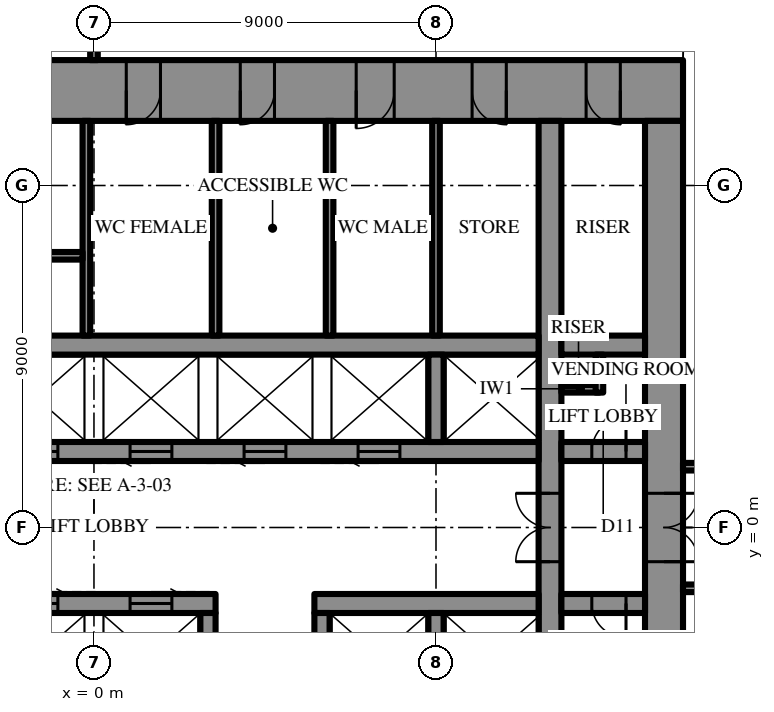
"""IFC4 building model, lengths in metres.
Left out: names, types, materials, properties, quantities, classifications, styles, units other than length and angle.
Written with IfcOpenShell. Run it as: python <this file> out.ifc"""

import sys

from ifc_helpers import new_model, si_unit, direction, frame, frame_2d, origin, place, context, subcontext, project, spatial, rectangle, extrude, element, fill, save


model = new_model("IFC4")
c1 = context("Model", 3, precision=1e-05, world=origin(), true_north=direction((0.0, 1.0)))
c2 = subcontext(c1, "Body", "Model", "MODEL_VIEW")
j1 = project(units=[si_unit("LENGTHUNIT", "METRE"), si_unit("PLANEANGLEUNIT", "RADIAN")], contexts=[c1])
p1 = place(None, origin())
s1 = spatial("IfcSite", under=j1, at=p1, CompositionType="ELEMENT")
p2 = place(p1, origin())
s2 = spatial("IfcBuilding", under=s1, at=p2, CompositionType="ELEMENT")
p3 = place(p2, frame((0.0, 0.0, 219.7)))
s3 = spatial("IfcBuildingStorey", under=s2, at=p3, CompositionType="ELEMENT", Elevation=219.7)
p4 = place(p3, frame((-15.5, 11.5, 0.0), z_axis=(0.0, 0.0, 1.0), x_axis=(1.0, 0.0, 0.0)))
e1 = element("IfcWall", 1, at=p4, inside=s3, PredefinedType="SHEAR", context=c2, shape_type="SweptSolid", body=[
    extrude(rectangle(XDim=31.0, YDim=1.6, at=frame_2d((15.5, 0.0))), origin(), (0.0, 0.0, 1.0), 4.2),
])
p5 = place(p4, frame((16.35, 0.0, 0.0)))
e2 = element("IfcOpeningElement", 2, at=p5, cuts=e1, PredefinedType="OPENING", context=c2, shape_type="SweptSolid", body=[
    extrude(rectangle(XDim=0.9, YDim=2.2, at=frame_2d((0.45, 1.1))), frame((0.0, 0.81, 0.0), z_axis=(0.0, -1.0, 0.0), x_axis=(1.0, 0.0, 0.0)), (0.0, 0.0, 1.0), 1.62),
])
p6 = place(p4, frame((19.35, 0.0, 0.0)))
e3 = element("IfcOpeningElement", 3, at=p6, cuts=e1, PredefinedType="OPENING", context=c2, shape_type="SweptSolid", body=[
    extrude(rectangle(XDim=0.9, YDim=2.2, at=frame_2d((0.45, 1.1))), frame((0.0, 0.81, 0.0), z_axis=(0.0, -1.0, 0.0), x_axis=(1.0, 0.0, 0.0)), (0.0, 0.0, 1.0), 1.62),
])
p7 = place(p4, frame((22.4, 0.0, 0.0)))
e4 = element("IfcOpeningElement", 4, at=p7, cuts=e1, PredefinedType="OPENING", context=c2, shape_type="SweptSolid", body=[
    extrude(rectangle(XDim=1.0, YDim=2.2, at=frame_2d((0.5, 1.1))), frame((0.0, 0.81, 0.0), z_axis=(0.0, -1.0, 0.0), x_axis=(1.0, 0.0, 0.0)), (0.0, 0.0, 1.0), 1.62),
])
p8 = place(p4, frame((1.65, 0.0, 0.0)))
e5 = element("IfcOpeningElement", 5, at=p8, cuts=e1, PredefinedType="OPENING", context=c2, shape_type="SweptSolid", body=[
    extrude(rectangle(XDim=0.9, YDim=2.2, at=frame_2d((0.45, 1.1))), frame((0.0, 0.81, 0.0), z_axis=(0.0, -1.0, 0.0), x_axis=(1.0, 0.0, 0.0)), (0.0, 0.0, 1.0), 1.62),
])
p9 = place(p4, frame((4.65, 0.0, 0.0)))
e6 = element("IfcOpeningElement", 6, at=p9, cuts=e1, PredefinedType="OPENING", context=c2, shape_type="SweptSolid", body=[
    extrude(rectangle(XDim=0.9, YDim=2.2, at=frame_2d((0.45, 1.1))), frame((0.0, 0.81, 0.0), z_axis=(0.0, -1.0, 0.0), x_axis=(1.0, 0.0, 0.0)), (0.0, 0.0, 1.0), 1.62),
])
p10 = place(p4, frame((25.45, 0.0, 0.0)))
e7 = element("IfcOpeningElement", 7, at=p10, cuts=e1, PredefinedType="OPENING", context=c2, shape_type="SweptSolid", body=[
    extrude(rectangle(XDim=0.9, YDim=2.2, at=frame_2d((0.45, 1.1))), frame((0.0, 0.81, 0.0), z_axis=(0.0, -1.0, 0.0), x_axis=(1.0, 0.0, 0.0)), (0.0, 0.0, 1.0), 1.62),
])
p11 = place(p4, frame((28.45, 0.0, 0.0)))
e8 = element("IfcOpeningElement", 8, at=p11, cuts=e1, PredefinedType="OPENING", context=c2, shape_type="SweptSolid", body=[
    extrude(rectangle(XDim=0.9, YDim=2.2, at=frame_2d((0.45, 1.1))), frame((0.0, 0.81, 0.0), z_axis=(0.0, -1.0, 0.0), x_axis=(1.0, 0.0, 0.0)), (0.0, 0.0, 1.0), 1.62),
])
p12 = place(p3, frame((15.0, -10.7, 0.0), z_axis=(0.0, 0.0, 1.0), x_axis=(0.0, 1.0, 0.0)))
e9 = element("IfcWall", 9, at=p12, inside=s3, PredefinedType="SHEAR", context=c2, shape_type="SweptSolid", body=[
    extrude(rectangle(XDim=21.4, YDim=1.0, at=frame_2d((10.7, 0.0))), origin(), (0.0, 0.0, 1.0), 4.2),
])
p13 = place(p12, frame((9.8, 0.0, 0.0)))
e10 = element("IfcOpeningElement", 10, at=p13, cuts=e9, PredefinedType="OPENING", context=c2, shape_type="SweptSolid", body=[
    extrude(rectangle(XDim=1.8, YDim=2.4, at=frame_2d((0.9, 1.2))), frame((0.0, 0.51, 0.0), z_axis=(0.0, -1.0, 0.0), x_axis=(1.0, 0.0, 0.0)), (0.0, 0.0, 1.0), 1.02),
])
p14 = place(p3, frame((12.0, -10.7, 0.0), z_axis=(0.0, 0.0, 1.0), x_axis=(0.0, 1.0, 0.0)))
e11 = element("IfcWall", 11, at=p14, inside=s3, PredefinedType="SHEAR", context=c2, shape_type="SweptSolid", body=[
    extrude(rectangle(XDim=21.4, YDim=0.6, at=frame_2d((10.7, 0.0))), origin(), (0.0, 0.0, 1.0), 4.2),
])
p15 = place(p14, frame((9.8, 0.0, 0.0)))
e12 = element("IfcOpeningElement", 12, at=p15, cuts=e11, PredefinedType="OPENING", context=c2, shape_type="SweptSolid", body=[
    extrude(rectangle(XDim=1.8, YDim=2.4, at=frame_2d((0.9, 1.2))), frame((0.0, 0.31, 0.0), z_axis=(0.0, -1.0, 0.0), x_axis=(1.0, 0.0, 0.0)), (0.0, 0.0, 1.0), 0.62),
])
p16 = place(p3, frame((-3.2, 2.0, 0.0), z_axis=(0.0, 0.0, 1.0), x_axis=(1.0, 0.0, 0.0)))
e13 = element("IfcWall", 13, at=p16, inside=s3, PredefinedType="SHEAR", context=c2, shape_type="SweptSolid", body=[
    extrude(rectangle(XDim=14.9, YDim=0.5, at=frame_2d((7.45, 0.0))), origin(), (0.0, 0.0, 1.0), 4.2),
])
p17 = place(p16, frame((1.15, 0.0, 0.0)))
e14 = element("IfcOpeningElement", 14, at=p17, cuts=e13, PredefinedType="OPENING", context=c2, shape_type="SweptSolid", body=[
    extrude(rectangle(XDim=1.1, YDim=2.2, at=frame_2d((0.55, 1.1))), frame((0.0, 0.26, 0.0), z_axis=(0.0, -1.0, 0.0), x_axis=(1.0, 0.0, 0.0)), (0.0, 0.0, 1.0), 0.52),
])
p18 = place(p16, frame((4.15, 0.0, 0.0)))
e15 = element("IfcOpeningElement", 15, at=p18, cuts=e13, PredefinedType="OPENING", context=c2, shape_type="SweptSolid", body=[
    extrude(rectangle(XDim=1.1, YDim=2.2, at=frame_2d((0.55, 1.1))), frame((0.0, 0.26, 0.0), z_axis=(0.0, -1.0, 0.0), x_axis=(1.0, 0.0, 0.0)), (0.0, 0.0, 1.0), 0.52),
])
p19 = place(p16, frame((7.15, 0.0, 0.0)))
e16 = element("IfcOpeningElement", 16, at=p19, cuts=e13, PredefinedType="OPENING", context=c2, shape_type="SweptSolid", body=[
    extrude(rectangle(XDim=1.1, YDim=2.2, at=frame_2d((0.55, 1.1))), frame((0.0, 0.26, 0.0), z_axis=(0.0, -1.0, 0.0), x_axis=(1.0, 0.0, 0.0)), (0.0, 0.0, 1.0), 0.52),
])
p20 = place(p16, frame((10.15, 0.0, 0.0)))
e17 = element("IfcOpeningElement", 17, at=p20, cuts=e13, PredefinedType="OPENING", context=c2, shape_type="SweptSolid", body=[
    extrude(rectangle(XDim=1.1, YDim=2.2, at=frame_2d((0.55, 1.1))), frame((0.0, 0.26, 0.0), z_axis=(0.0, -1.0, 0.0), x_axis=(1.0, 0.0, 0.0)), (0.0, 0.0, 1.0), 0.52),
])
p21 = place(p3, frame((12.3, 2.0, 0.0), z_axis=(0.0, 0.0, 1.0), x_axis=(1.0, 0.0, 0.0)))
e18 = element("IfcWall", 18, at=p21, inside=s3, PredefinedType="SHEAR", context=c2, shape_type="SweptSolid", body=[
    extrude(rectangle(XDim=2.2, YDim=0.5, at=frame_2d((1.1, 0.0))), origin(), (0.0, 0.0, 1.0), 4.2),
])
p22 = place(p21, frame((0.8, 0.0, 0.0)))
e19 = element("IfcOpeningElement", 19, at=p22, cuts=e18, PredefinedType="OPENING", context=c2, shape_type="SweptSolid", body=[
    extrude(rectangle(XDim=0.9, YDim=2.2, at=frame_2d((0.45, 1.1))), frame((0.0, 0.26, 0.0), z_axis=(0.0, -1.0, 0.0), x_axis=(1.0, 0.0, 0.0)), (0.0, 0.0, 1.0), 0.52),
])
p23 = place(p3, frame((-11.7, 4.8, 0.0), z_axis=(0.0, 0.0, 1.0), x_axis=(1.0, 0.0, 0.0)))
e20 = element("IfcWall", 20, at=p23, inside=s3, PredefinedType="SHEAR", context=c2, shape_type="SweptSolid", body=[
    extrude(rectangle(XDim=23.4, YDim=0.5, at=frame_2d((11.7, 0.0))), origin(), (0.0, 0.0, 1.0), 4.2),
])
p24 = place(p23, frame((6.6, 0.0, 0.0)))
e21 = element("IfcOpeningElement", 21, at=p24, cuts=e20, PredefinedType="OPENING", context=c2, shape_type="SweptSolid", body=[
    extrude(rectangle(XDim=1.2, YDim=2.2, at=frame_2d((0.6, 1.1))), frame((0.0, 0.26, 0.0), z_axis=(0.0, -1.0, 0.0), x_axis=(1.0, 0.0, 0.0)), (0.0, 0.0, 1.0), 0.52),
])
p25 = place(p23, frame((3.6, 0.0, 0.0)))
e22 = element("IfcOpeningElement", 22, at=p25, cuts=e20, PredefinedType="OPENING", context=c2, shape_type="SweptSolid", body=[
    extrude(rectangle(XDim=1.2, YDim=2.2, at=frame_2d((0.6, 1.1))), frame((0.0, 0.26, 0.0), z_axis=(0.0, -1.0, 0.0), x_axis=(1.0, 0.0, 0.0)), (0.0, 0.0, 1.0), 0.52),
])
p26 = place(p3, frame((12.3, 4.8, 0.0), z_axis=(0.0, 0.0, 1.0), x_axis=(1.0, 0.0, 0.0)))
e23 = element("IfcWall", 23, at=p26, inside=s3, PredefinedType="SHEAR", context=c2, shape_type="SweptSolid", body=[
    extrude(rectangle(XDim=2.2, YDim=0.5, at=frame_2d((1.1, 0.0))), origin(), (0.0, 0.0, 1.0), 4.2),
])
p27 = place(p3, frame((9.0, 2.25, 0.0), z_axis=(0.0, 0.0, 1.0), x_axis=(0.0, 1.0, 0.0)))
e24 = element("IfcWall", 24, at=p27, inside=s3, PredefinedType="SHEAR", context=c2, shape_type="SweptSolid", body=[
    extrude(rectangle(XDim=2.3, YDim=0.4, at=frame_2d((1.15, 0.0))), origin(), (0.0, 0.0, 1.0), 4.2),
])
p28 = place(p3, frame((-0.2, 5.05, 0.0), z_axis=(0.0, 0.0, 1.0), x_axis=(0.0, 1.0, 0.0)))
e25 = element("IfcWall", 25, at=p28, inside=s3, PredefinedType="SHEAR", context=c2, shape_type="SweptSolid", body=[
    extrude(rectangle(XDim=5.65, YDim=0.2, at=frame_2d((2.825, 0.0))), origin(), (0.0, 0.0, 1.0), 4.2),
])
p29 = place(p3, frame((-8.9, 7.15, 0.0), z_axis=(0.0, 0.0, 1.0), x_axis=(1.0, 0.0, 0.0)))
e26 = element("IfcWall", 26, at=p29, inside=s3, PredefinedType="SHEAR", context=c2, shape_type="SweptSolid", body=[
    extrude(rectangle(XDim=8.6, YDim=0.2, at=frame_2d((4.3, 0.0))), origin(), (0.0, 0.0, 1.0), 4.2),
])
p30 = place(p29, frame((0.3, 0.0, 0.0)))
e27 = element("IfcOpeningElement", 27, at=p30, cuts=e26, PredefinedType="OPENING", context=c2, shape_type="SweptSolid", body=[
    extrude(rectangle(XDim=1.0, YDim=2.2, at=frame_2d((0.5, 1.1))), frame((0.0, 0.11, 0.0), z_axis=(0.0, -1.0, 0.0), x_axis=(1.0, 0.0, 0.0)), (0.0, 0.0, 1.0), 0.22),
])
p31 = place(p3, frame((14.5, -2.0, 0.0), z_axis=(0.0, 0.0, 1.0), x_axis=(-1.0, 0.0, 0.0)))
e28 = element("IfcWall", 28, at=p31, inside=s3, PredefinedType="SHEAR", context=c2, shape_type="SweptSolid", body=[
    extrude(rectangle(XDim=2.2, YDim=0.5, at=frame_2d((1.1, 0.0))), origin(), (0.0, 0.0, 1.0), 4.2),
])
p32 = place(p31, frame((0.5, 0.0, 0.0)))
e29 = element("IfcOpeningElement", 29, at=p32, cuts=e28, PredefinedType="OPENING", context=c2, shape_type="SweptSolid", body=[
    extrude(rectangle(XDim=0.9, YDim=2.2, at=frame_2d((0.45, 1.1))), frame((0.0, 0.26, 0.0), z_axis=(0.0, -1.0, 0.0), x_axis=(1.0, 0.0, 0.0)), (0.0, 0.0, 1.0), 0.52),
])
p33 = place(p3, frame((11.7, -2.0, 0.0), z_axis=(0.0, 0.0, 1.0), x_axis=(-1.0, 0.0, 0.0)))
e30 = element("IfcWall", 30, at=p33, inside=s3, PredefinedType="SHEAR", context=c2, shape_type="SweptSolid", body=[
    extrude(rectangle(XDim=5.9, YDim=0.5, at=frame_2d((2.95, 0.0))), origin(), (0.0, 0.0, 1.0), 4.2),
])
p34 = place(p3, frame((3.2, -2.0, 0.0), z_axis=(0.0, 0.0, 1.0), x_axis=(-1.0, 0.0, 0.0)))
e31 = element("IfcWall", 31, at=p34, inside=s3, PredefinedType="SHEAR", context=c2, shape_type="SweptSolid", body=[
    extrude(rectangle(XDim=14.9, YDim=0.5, at=frame_2d((7.45, 0.0))), origin(), (0.0, 0.0, 1.0), 4.2),
])
p35 = place(p34, frame((1.15, 0.0, 0.0)))
e32 = element("IfcOpeningElement", 32, at=p35, cuts=e31, PredefinedType="OPENING", context=c2, shape_type="SweptSolid", body=[
    extrude(rectangle(XDim=1.1, YDim=2.2, at=frame_2d((0.55, 1.1))), frame((0.0, 0.26, 0.0), z_axis=(0.0, -1.0, 0.0), x_axis=(1.0, 0.0, 0.0)), (0.0, 0.0, 1.0), 0.52),
])
p36 = place(p34, frame((4.15, 0.0, 0.0)))
e33 = element("IfcOpeningElement", 33, at=p36, cuts=e31, PredefinedType="OPENING", context=c2, shape_type="SweptSolid", body=[
    extrude(rectangle(XDim=1.1, YDim=2.2, at=frame_2d((0.55, 1.1))), frame((0.0, 0.26, 0.0), z_axis=(0.0, -1.0, 0.0), x_axis=(1.0, 0.0, 0.0)), (0.0, 0.0, 1.0), 0.52),
])
p37 = place(p34, frame((7.15, 0.0, 0.0)))
e34 = element("IfcOpeningElement", 34, at=p37, cuts=e31, PredefinedType="OPENING", context=c2, shape_type="SweptSolid", body=[
    extrude(rectangle(XDim=1.1, YDim=2.2, at=frame_2d((0.55, 1.1))), frame((0.0, 0.26, 0.0), z_axis=(0.0, -1.0, 0.0), x_axis=(1.0, 0.0, 0.0)), (0.0, 0.0, 1.0), 0.52),
])
p38 = place(p34, frame((10.15, 0.0, 0.0)))
e35 = element("IfcOpeningElement", 35, at=p38, cuts=e31, PredefinedType="OPENING", context=c2, shape_type="SweptSolid", body=[
    extrude(rectangle(XDim=1.1, YDim=2.2, at=frame_2d((0.55, 1.1))), frame((0.0, 0.26, 0.0), z_axis=(0.0, -1.0, 0.0), x_axis=(1.0, 0.0, 0.0)), (0.0, 0.0, 1.0), 0.52),
])
for number, where, z_axis, x_axis in (
    (36, (9.0, -2.25, 0.0), (0.0, 0.0, 1.0), (0.0, -1.0, 0.0)),
    (37, (6.0, -2.25, 0.0), (0.0, 0.0, 1.0), (0.0, -1.0, 0.0)),
    (38, (3.0, -2.25, 0.0), (0.0, 0.0, 1.0), (0.0, -1.0, 0.0)),
):
    element("IfcWall", number, at=place(p3, frame(where, z_axis=z_axis, x_axis=x_axis)), inside=s3, PredefinedType="SHEAR", context=c2, shape_type="SweptSolid", body=[
        extrude(rectangle(XDim=2.3, YDim=0.4, at=frame_2d((1.15, 0.0))), origin(), (0.0, 0.0, 1.0), 4.2),
    ])
for number, where, z_axis, x_axis in (
    (39, (9.0, 5.05, 0.0), (0.0, 0.0, 1.0), (0.0, 1.0, 0.0)),
    (40, (3.2, 5.05, 0.0), (0.0, 0.0, 1.0), (0.0, 1.0, 0.0)),
    (41, (6.2, 5.05, 0.0), (0.0, 0.0, 1.0), (0.0, 1.0, 0.0)),
):
    element("IfcWall", number, at=place(p3, frame(where, z_axis=z_axis, x_axis=x_axis)), inside=s3, PredefinedType="PARTITIONING", context=c2, shape_type="SweptSolid", body=[
        extrude(rectangle(XDim=5.65, YDim=0.2, at=frame_2d((2.825, 0.0))), origin(), (0.0, 0.0, 1.0), 4.0),
    ])
for number, where, z_axis, x_axis in (
    (42, (12.3, 3.65, 0.0), (0.0, 0.0, 1.0), (1.0, 0.0, 0.0)),
    (43, (13.3, 3.55, 0.0), (0.0, 0.0, 1.0), (0.0, 1.0, 0.0)),
):
    element("IfcWall", number, at=place(p3, frame(where, z_axis=z_axis, x_axis=x_axis)), inside=s3, PredefinedType="PARTITIONING", context=c2, shape_type="SweptSolid", body=[
        extrude(rectangle(XDim=1.0, YDim=0.2, at=frame_2d((0.5, 0.0))), origin(), (0.0, 0.0, 1.0), 4.0),
    ])
for number, where, z_axis, x_axis in (
    (44, (15.5, 1.6, 0.0), (0.0, 0.0, 1.0), (1.0, 0.0, 0.0)),
    (45, (15.5, -1.6, 0.0), (0.0, 0.0, 1.0), (1.0, 0.0, 0.0)),
):
    element("IfcWall", number, at=place(p3, frame(where, z_axis=z_axis, x_axis=x_axis)), inside=s3, PredefinedType="PARTITIONING", context=c2, shape_type="SweptSolid", body=[
        extrude(rectangle(XDim=2.3, YDim=0.2, at=frame_2d((1.15, 0.0))), origin(), (0.0, 0.0, 1.0), 4.0),
    ])
p39 = place(p3, frame((0.0, 12.3, 0.0), z_axis=(0.0, 0.0, 1.0), x_axis=(0.0, 1.0, 0.0)))
e46 = element("IfcWall", 46, at=p39, inside=s3, PredefinedType="PARTITIONING", context=c2, shape_type="SweptSolid", body=[
    extrude(rectangle(XDim=1.7, YDim=0.2, at=frame_2d((0.85, 0.0))), origin(), (0.0, 0.0, 1.0), 2.992),
])
p40 = place(p39, frame((0.35, 0.0, 0.0)))
e47 = element("IfcOpeningElement", 47, at=p40, cuts=e46, PredefinedType="OPENING", context=c2, shape_type="SweptSolid", body=[
    extrude(rectangle(XDim=1.0, YDim=2.2, at=frame_2d((0.5, 1.1))), frame((0.0, 0.11, 0.0), z_axis=(0.0, -1.0, 0.0), x_axis=(1.0, 0.0, 0.0)), (0.0, 0.0, 1.0), 0.22),
])
p41 = place(p13, frame((1.8, 0.0, 0.0), z_axis=(0.0, 0.0, 1.0), x_axis=(-1.0, 0.0, 0.0)))
e48 = element("IfcDoor", 48, at=p41, inside=s3, OperationType="DOUBLE_DOOR_SINGLE_SWING", PredefinedType="DOOR", context=c2, shape_type="SweptSolid", body=[
    extrude(rectangle(XDim=1.8, YDim=2.4, at=frame_2d((0.9, 1.2))), frame((0.0, 0.025, 0.0), z_axis=(0.0, -1.0, 0.0), x_axis=(1.0, 0.0, 0.0)), (0.0, 0.0, 1.0), 0.05),
])
fill(e10, e48)
p42 = place(p5, frame((0.9, 0.0, 0.0), z_axis=(0.0, 0.0, 1.0), x_axis=(-1.0, 0.0, 0.0)))
e49 = element("IfcDoor", 49, at=p42, inside=s3, OperationType="SINGLE_SWING_LEFT", PredefinedType="DOOR", context=c2, shape_type="SweptSolid", body=[
    extrude(rectangle(XDim=0.9, YDim=2.2, at=frame_2d((0.45, 1.1))), frame((0.0, 0.025, 0.0), z_axis=(0.0, -1.0, 0.0), x_axis=(1.0, 0.0, 0.0)), (0.0, 0.0, 1.0), 0.05),
])
fill(e2, e49)
p43 = place(p6, frame((0.9, 0.0, 0.0), z_axis=(0.0, 0.0, 1.0), x_axis=(-1.0, 0.0, 0.0)))
e50 = element("IfcDoor", 50, at=p43, inside=s3, OperationType="SINGLE_SWING_LEFT", PredefinedType="DOOR", context=c2, shape_type="SweptSolid", body=[
    extrude(rectangle(XDim=0.9, YDim=2.2, at=frame_2d((0.45, 1.1))), frame((0.0, 0.025, 0.0), z_axis=(0.0, -1.0, 0.0), x_axis=(1.0, 0.0, 0.0)), (0.0, 0.0, 1.0), 0.05),
])
fill(e3, e50)
p44 = place(p7, frame((1.0, 0.0, 0.0), z_axis=(0.0, 0.0, 1.0), x_axis=(-1.0, 0.0, 0.0)))
e51 = element("IfcDoor", 51, at=p44, inside=s3, OperationType="SINGLE_SWING_LEFT", PredefinedType="DOOR", context=c2, shape_type="SweptSolid", body=[
    extrude(rectangle(XDim=1.0, YDim=2.2, at=frame_2d((0.5, 1.1))), frame((0.0, 0.025, 0.0), z_axis=(0.0, -1.0, 0.0), x_axis=(1.0, 0.0, 0.0)), (0.0, 0.0, 1.0), 0.05),
])
fill(e4, e51)
p45 = place(p10, frame((0.9, 0.0, 0.0), z_axis=(0.0, 0.0, 1.0), x_axis=(-1.0, 0.0, 0.0)))
e52 = element("IfcDoor", 52, at=p45, inside=s3, OperationType="SINGLE_SWING_RIGHT", PredefinedType="DOOR", context=c2, shape_type="SweptSolid", body=[
    extrude(rectangle(XDim=0.9, YDim=2.2, at=frame_2d((0.45, 1.1))), frame((0.0, 0.025, 0.0), z_axis=(0.0, -1.0, 0.0), x_axis=(1.0, 0.0, 0.0)), (0.0, 0.0, 1.0), 0.05),
])
fill(e7, e52)
p46 = place(p11, frame((0.9, 0.0, 0.0), z_axis=(0.0, 0.0, 1.0), x_axis=(-1.0, 0.0, 0.0)))
e53 = element("IfcDoor", 53, at=p46, inside=s3, OperationType="SINGLE_SWING_RIGHT", PredefinedType="DOOR", context=c2, shape_type="SweptSolid", body=[
    extrude(rectangle(XDim=0.9, YDim=2.2, at=frame_2d((0.45, 1.1))), frame((0.0, 0.025, 0.0), z_axis=(0.0, -1.0, 0.0), x_axis=(1.0, 0.0, 0.0)), (0.0, 0.0, 1.0), 0.05),
])
fill(e8, e53)
p47 = place(p22, origin())
e54 = element("IfcDoor", 54, at=p47, inside=s3, OperationType="SINGLE_SWING_LEFT", PredefinedType="DOOR", context=c2, shape_type="SweptSolid", body=[
    extrude(rectangle(XDim=0.9, YDim=2.2, at=frame_2d((0.45, 1.1))), frame((0.0, 0.025, 0.0), z_axis=(0.0, -1.0, 0.0), x_axis=(1.0, 0.0, 0.0)), (0.0, 0.0, 1.0), 0.05),
])
fill(e19, e54)
p48 = place(p32, origin())
e55 = element("IfcDoor", 55, at=p48, inside=s3, OperationType="SINGLE_SWING_RIGHT", PredefinedType="DOOR", context=c2, shape_type="SweptSolid", body=[
    extrude(rectangle(XDim=0.9, YDim=2.2, at=frame_2d((0.45, 1.1))), frame((0.0, 0.025, 0.0), z_axis=(0.0, -1.0, 0.0), x_axis=(1.0, 0.0, 0.0)), (0.0, 0.0, 1.0), 0.05),
])
fill(e29, e55)
p49 = place(p15, origin())
e56 = element("IfcDoor", 56, at=p49, inside=s3, OperationType="DOUBLE_DOOR_SINGLE_SWING", PredefinedType="DOOR", context=c2, shape_type="SweptSolid", body=[
    extrude(rectangle(XDim=1.8, YDim=2.4, at=frame_2d((0.9, 1.2))), frame((0.0, 0.025, 0.0), z_axis=(0.0, -1.0, 0.0), x_axis=(1.0, 0.0, 0.0)), (0.0, 0.0, 1.0), 0.05),
])
fill(e12, e56)
p50 = place(p17, frame((1.1, 0.0, 0.0), z_axis=(0.0, 0.0, 1.0), x_axis=(-1.0, 0.0, 0.0)))
e57 = element("IfcDoor", 57, at=p50, inside=s3, OperationType="SLIDING_TO_LEFT", PredefinedType="DOOR", context=c2, shape_type="SweptSolid", body=[
    extrude(rectangle(XDim=1.1, YDim=2.2, at=frame_2d((0.55, 1.1))), frame((0.0, 0.025, 0.0), z_axis=(0.0, -1.0, 0.0), x_axis=(1.0, 0.0, 0.0)), (0.0, 0.0, 1.0), 0.05),
])
fill(e14, e57)
p51 = place(p18, frame((1.1, 0.0, 0.0), z_axis=(0.0, 0.0, 1.0), x_axis=(-1.0, 0.0, 0.0)))
e58 = element("IfcDoor", 58, at=p51, inside=s3, OperationType="SLIDING_TO_LEFT", PredefinedType="DOOR", context=c2, shape_type="SweptSolid", body=[
    extrude(rectangle(XDim=1.1, YDim=2.2, at=frame_2d((0.55, 1.1))), frame((0.0, 0.025, 0.0), z_axis=(0.0, -1.0, 0.0), x_axis=(1.0, 0.0, 0.0)), (0.0, 0.0, 1.0), 0.05),
])
fill(e15, e58)
p52 = place(p19, frame((1.1, 0.0, 0.0), z_axis=(0.0, 0.0, 1.0), x_axis=(-1.0, 0.0, 0.0)))
e59 = element("IfcDoor", 59, at=p52, inside=s3, OperationType="SLIDING_TO_LEFT", PredefinedType="DOOR", context=c2, shape_type="SweptSolid", body=[
    extrude(rectangle(XDim=1.1, YDim=2.2, at=frame_2d((0.55, 1.1))), frame((0.0, 0.025, 0.0), z_axis=(0.0, -1.0, 0.0), x_axis=(1.0, 0.0, 0.0)), (0.0, 0.0, 1.0), 0.05),
])
fill(e16, e59)
p53 = place(p20, frame((1.1, 0.0, 0.0), z_axis=(0.0, 0.0, 1.0), x_axis=(-1.0, 0.0, 0.0)))
e60 = element("IfcDoor", 60, at=p53, inside=s3, OperationType="SLIDING_TO_LEFT", PredefinedType="DOOR", context=c2, shape_type="SweptSolid", body=[
    extrude(rectangle(XDim=1.1, YDim=2.2, at=frame_2d((0.55, 1.1))), frame((0.0, 0.025, 0.0), z_axis=(0.0, -1.0, 0.0), x_axis=(1.0, 0.0, 0.0)), (0.0, 0.0, 1.0), 0.05),
])
fill(e17, e60)
p54 = place(p35, frame((1.1, 0.0, 0.0), z_axis=(0.0, 0.0, 1.0), x_axis=(-1.0, 0.0, 0.0)))
e61 = element("IfcDoor", 61, at=p54, inside=s3, OperationType="SLIDING_TO_LEFT", PredefinedType="DOOR", context=c2, shape_type="SweptSolid", body=[
    extrude(rectangle(XDim=1.1, YDim=2.2, at=frame_2d((0.55, 1.1))), frame((0.0, 0.025, 0.0), z_axis=(0.0, -1.0, 0.0), x_axis=(1.0, 0.0, 0.0)), (0.0, 0.0, 1.0), 0.05),
])
fill(e32, e61)
p55 = place(p36, frame((1.1, 0.0, 0.0), z_axis=(0.0, 0.0, 1.0), x_axis=(-1.0, 0.0, 0.0)))
e62 = element("IfcDoor", 62, at=p55, inside=s3, OperationType="SLIDING_TO_LEFT", PredefinedType="DOOR", context=c2, shape_type="SweptSolid", body=[
    extrude(rectangle(XDim=1.1, YDim=2.2, at=frame_2d((0.55, 1.1))), frame((0.0, 0.025, 0.0), z_axis=(0.0, -1.0, 0.0), x_axis=(1.0, 0.0, 0.0)), (0.0, 0.0, 1.0), 0.05),
])
fill(e33, e62)
save(model, sys.argv[1])
